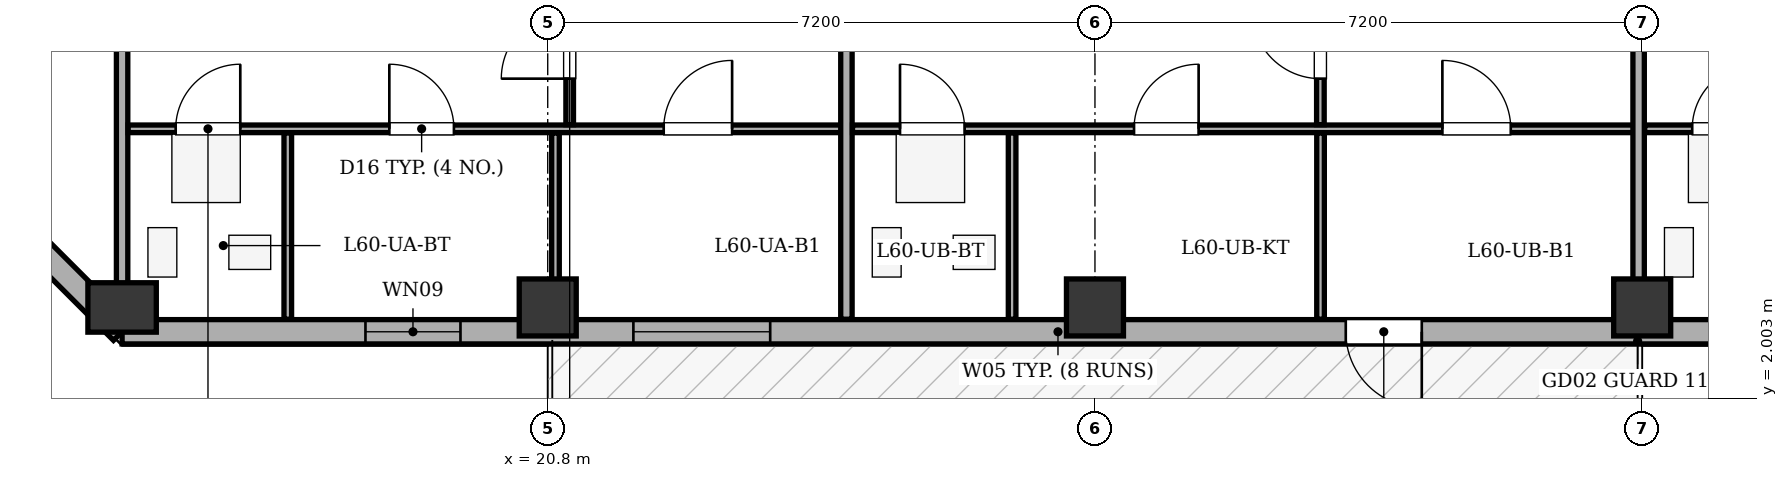
"""IFC4 building model, lengths in metres.
Left out: names, types, materials, properties, quantities, classifications, styles, units other than length and angle.
Written with IfcOpenShell. Run it as: python <this file> out.ifc"""

import sys

from ifc_helpers import new_model, si_unit, direction, frame, frame_2d, origin, origin_2d, place, context, subcontext, project, spatial, rectangle, extrude, element, fill, save


model = new_model("IFC4")
c1 = context("Model", 3, precision=1e-05, world=origin(), true_north=direction((0.0, 1.0)))
c2 = subcontext(c1, "Body", "Model", "MODEL_VIEW")
j1 = project(units=[si_unit("LENGTHUNIT", "METRE"), si_unit("PLANEANGLEUNIT", "RADIAN")], contexts=[c1])
p1 = place(None, origin())
s1 = spatial("IfcSite", under=j1, at=p1, CompositionType="ELEMENT")
p2 = place(p1, origin())
s2 = spatial("IfcBuilding", under=s1, at=p2, CompositionType="ELEMENT")
p3 = place(p2, frame((0.0, 0.0, 231.3)))
s3 = spatial("IfcBuildingStorey", under=s2, at=p3, CompositionType="ELEMENT", Elevation=231.3)
p4 = place(p3, frame((15.2, 3.2, 0.0), z_axis=(0.0, 0.0, 1.0), x_axis=(1.0, 0.0, 0.0)))
e1 = element("IfcColumn", 1, at=p4, inside=s3, PredefinedType="COLUMN", context=c2, shape_type="SweptSolid", body=[
    extrude(rectangle(XDim=0.65, YDim=0.9, at=origin_2d()), origin(), (0.0, 0.0, 1.0), 3.4),
])
for number, where, z_axis, x_axis in (
    (2, (20.8, 3.2, 0.0), (0.0, 0.0, 1.0), (1.0, 0.0, 0.0)),
    (3, (28.0, 3.2, 0.0), (0.0, 0.0, 1.0), (1.0, 0.0, 0.0)),
    (4, (35.2, 3.2, 0.0), (0.0, 0.0, 1.0), (1.0, 0.0, 0.0)),
):
    element("IfcColumn", number, at=place(p3, frame(where, z_axis=z_axis, x_axis=x_axis)), inside=s3, PredefinedType="COLUMN", context=c2, shape_type="SweptSolid", body=[
        extrude(rectangle(XDim=0.75, YDim=0.75, at=origin_2d()), origin(), (0.0, 0.0, 1.0), 3.4),
    ])
p5 = place(p3, frame((51.2, 2.88, 0.0), z_axis=(0.0, 0.0, 1.0), x_axis=(-1.0, 0.0, 0.0)))
e5 = element("IfcWall", 5, at=p5, inside=s3, PredefinedType="STANDARD", context=c2, shape_type="SweptSolid", body=[
    extrude(rectangle(XDim=36.0, YDim=0.32, at=frame_2d((18.0, 0.0))), origin(), (0.0, 0.0, 1.0), 2.725),
])
p6 = place(p5, frame((18.9, 0.0, 0.0)))
e6 = element("IfcOpeningElement", 6, at=p6, cuts=e5, PredefinedType="OPENING", context=c2, shape_type="SweptSolid", body=[
    extrude(rectangle(XDim=1.0, YDim=2.02, at=frame_2d((0.5, 1.01))), frame((0.0, 0.17, 0.0), z_axis=(0.0, -1.0, 0.0), x_axis=(1.0, 0.0, 0.0)), (0.0, 0.0, 1.0), 0.34),
])
p7 = place(p5, frame((2.31, 0.0, 0.75)))
e7 = element("IfcOpeningElement", 7, at=p7, cuts=e5, PredefinedType="OPENING", context=c2, shape_type="SweptSolid", body=[
    extrude(rectangle(XDim=1.8, YDim=1.7, at=frame_2d((0.9, 0.85))), frame((0.0, 0.17, 0.0), z_axis=(0.0, -1.0, 0.0), x_axis=(1.0, 0.0, 0.0)), (0.0, 0.0, 1.0), 0.34),
])
p8 = place(p5, frame((7.294, 0.0, 0.75)))
e8 = element("IfcOpeningElement", 8, at=p8, cuts=e5, PredefinedType="OPENING", context=c2, shape_type="SweptSolid", body=[
    extrude(rectangle(XDim=1.8, YDim=1.7, at=frame_2d((0.9, 0.85))), frame((0.0, 0.17, 0.0), z_axis=(0.0, -1.0, 0.0), x_axis=(1.0, 0.0, 0.0)), (0.0, 0.0, 1.0), 0.34),
])
p9 = place(p5, frame((11.117, 0.0, 0.75)))
e9 = element("IfcOpeningElement", 9, at=p9, cuts=e5, PredefinedType="OPENING", context=c2, shape_type="SweptSolid", body=[
    extrude(rectangle(XDim=1.8, YDim=1.7, at=frame_2d((0.9, 0.85))), frame((0.0, 0.17, 0.0), z_axis=(0.0, -1.0, 0.0), x_axis=(1.0, 0.0, 0.0)), (0.0, 0.0, 1.0), 0.34),
])
p10 = place(p5, frame((27.473, 0.0, 0.75)))
e10 = element("IfcOpeningElement", 10, at=p10, cuts=e5, PredefinedType="OPENING", context=c2, shape_type="SweptSolid", body=[
    extrude(rectangle(XDim=1.8, YDim=1.7, at=frame_2d((0.9, 0.85))), frame((0.0, 0.17, 0.0), z_axis=(0.0, -1.0, 0.0), x_axis=(1.0, 0.0, 0.0)), (0.0, 0.0, 1.0), 0.34),
])
p11 = place(p5, frame((31.548, 0.0, 0.75)))
e11 = element("IfcOpeningElement", 11, at=p11, cuts=e5, PredefinedType="OPENING", context=c2, shape_type="SweptSolid", body=[
    extrude(rectangle(XDim=1.25, YDim=1.7, at=frame_2d((0.625, 0.85))), frame((0.0, 0.17, 0.0), z_axis=(0.0, -1.0, 0.0), x_axis=(1.0, 0.0, 0.0)), (0.0, 0.0, 1.0), 0.34),
])
p12 = place(p3, frame((15.2, 2.88, 0.0), z_axis=(0.0, 0.0, 1.0), x_axis=(-0.707106781187, 0.707106781187, 0.0)))
e12 = element("IfcWall", 12, at=p12, inside=s3, PredefinedType="STANDARD", context=c2, shape_type="SweptSolid", body=[
    extrude(rectangle(XDim=6.11, YDim=0.32, at=frame_2d((3.055, 0.0))), origin(), (0.0, 0.0, 1.0), 2.725),
])
p13 = place(p12, frame((2.355, 0.0, 0.75)))
e13 = element("IfcOpeningElement", 13, at=p13, cuts=e12, PredefinedType="OPENING", context=c2, shape_type="SweptSolid", body=[
    extrude(rectangle(XDim=1.4, YDim=1.65, at=frame_2d((0.7, 0.825))), frame((0.0, 0.17, 0.0), z_axis=(0.0, -1.0, 0.0), x_axis=(1.0, 0.0, 0.0)), (0.0, 0.0, 1.0), 0.34),
])
p14 = place(p3, frame((15.2, 3.045, 0.0), z_axis=(0.0, 0.0, 1.0), x_axis=(0.0, 1.0, 0.0)))
e14 = element("IfcWall", 14, at=p14, inside=s3, PredefinedType="PARTITIONING", context=c2, shape_type="SweptSolid", body=[
    extrude(rectangle(XDim=15.255, YDim=0.15, at=frame_2d((7.627, 0.0))), origin(), (0.0, 0.0, 1.0), 3.1),
])
p15 = place(p3, frame((15.28, 5.55, 0.0), z_axis=(0.0, 0.0, 1.0), x_axis=(1.0, 0.0, 0.0)))
e15 = element("IfcWall", 15, at=p15, inside=s3, PredefinedType="PARTITIONING", context=c2, shape_type="SweptSolid", body=[
    extrude(rectangle(XDim=9.49, YDim=0.1, at=frame_2d((4.745, 0.0))), origin(), (0.0, 0.0, 1.0), 3.1),
])
p16 = place(p15, frame((0.625, 0.0, 0.0)))
e16 = element("IfcOpeningElement", 16, at=p16, cuts=e15, PredefinedType="OPENING", context=c2, shape_type="SweptSolid", body=[
    extrude(rectangle(XDim=0.85, YDim=2.05, at=frame_2d((0.425, 1.025))), frame((0.0, 0.06, 0.0), z_axis=(0.0, -1.0, 0.0), x_axis=(1.0, 0.0, 0.0)), (0.0, 0.0, 1.0), 0.12),
])
p17 = place(p15, frame((3.436, 0.0, 0.0)))
e17 = element("IfcOpeningElement", 17, at=p17, cuts=e15, PredefinedType="OPENING", context=c2, shape_type="SweptSolid", body=[
    extrude(rectangle(XDim=0.85, YDim=2.05, at=frame_2d((0.425, 1.025))), frame((0.0, 0.06, 0.0), z_axis=(0.0, -1.0, 0.0), x_axis=(1.0, 0.0, 0.0)), (0.0, 0.0, 1.0), 0.12),
])
p18 = place(p15, frame((7.046, 0.0, 0.0)))
e18 = element("IfcOpeningElement", 18, at=p18, cuts=e15, PredefinedType="OPENING", context=c2, shape_type="SweptSolid", body=[
    extrude(rectangle(XDim=0.9, YDim=2.05, at=frame_2d((0.45, 1.025))), frame((0.0, 0.06, 0.0), z_axis=(0.0, -1.0, 0.0), x_axis=(1.0, 0.0, 0.0)), (0.0, 0.0, 1.0), 0.12),
])
p19 = place(p3, frame((21.089, 5.605, 0.0), z_axis=(0.0, 0.0, 1.0), x_axis=(0.0, 1.0, 0.0)))
e19 = element("IfcWall", 19, at=p19, inside=s3, PredefinedType="PARTITIONING", context=c2, shape_type="SweptSolid", body=[
    extrude(rectangle(XDim=12.695, YDim=0.1, at=frame_2d((6.348, 0.0))), origin(), (0.0, 0.0, 1.0), 2.535),
])
p20 = place(p19, frame((0.605, 0.0, 0.0)))
e20 = element("IfcOpeningElement", 20, at=p20, cuts=e19, PredefinedType="OPENING", context=c2, shape_type="SweptSolid", body=[
    extrude(rectangle(XDim=0.9, YDim=2.05, at=frame_2d((0.45, 1.025))), frame((0.0, 0.06, 0.0), z_axis=(0.0, -1.0, 0.0), x_axis=(1.0, 0.0, 0.0)), (0.0, 0.0, 1.0), 0.12),
])
p21 = place(p3, frame((17.38, 3.045, 0.0), z_axis=(0.0, 0.0, 1.0), x_axis=(0.0, 1.0, 0.0)))
e21 = element("IfcWall", 21, at=p21, inside=s3, PredefinedType="PARTITIONING", context=c2, shape_type="SweptSolid", body=[
    extrude(rectangle(XDim=2.45, YDim=0.1, at=frame_2d((1.225, 0.0))), origin(), (0.0, 0.0, 1.0), 3.1),
])
p22 = place(p3, frame((20.902, 3.045, 0.0), z_axis=(0.0, 0.0, 1.0), x_axis=(0.0, 1.0, 0.0)))
e22 = element("IfcWall", 22, at=p22, inside=s3, PredefinedType="PARTITIONING", context=c2, shape_type="SweptSolid", body=[
    extrude(rectangle(XDim=2.45, YDim=0.1, at=frame_2d((1.225, 0.0))), origin(), (0.0, 0.0, 1.0), 2.535),
])
p23 = place(p3, frame((24.73, 3.045, 0.0), z_axis=(0.0, 0.0, 1.0), x_axis=(0.0, 1.0, 0.0)))
e23 = element("IfcWall", 23, at=p23, inside=s3, PredefinedType="PARTITIONING", context=c2, shape_type="SweptSolid", body=[
    extrude(rectangle(XDim=15.255, YDim=0.15, at=frame_2d((7.627, 0.0))), origin(), (0.0, 0.0, 1.0), 3.1),
])
p24 = place(p3, frame((24.81, 5.55, 0.0), z_axis=(0.0, 0.0, 1.0), x_axis=(1.0, 0.0, 0.0)))
e24 = element("IfcWall", 24, at=p24, inside=s3, PredefinedType="PARTITIONING", context=c2, shape_type="SweptSolid", body=[
    extrude(rectangle(XDim=10.383, YDim=0.1, at=frame_2d((5.191, 0.0))), origin(), (0.0, 0.0, 1.0), 3.1),
])
p25 = place(p24, frame((0.625, 0.0, 0.0)))
e25 = element("IfcOpeningElement", 25, at=p25, cuts=e24, PredefinedType="OPENING", context=c2, shape_type="SweptSolid", body=[
    extrude(rectangle(XDim=0.85, YDim=2.05, at=frame_2d((0.425, 1.025))), frame((0.0, 0.06, 0.0), z_axis=(0.0, -1.0, 0.0), x_axis=(1.0, 0.0, 0.0)), (0.0, 0.0, 1.0), 0.12),
])
p26 = place(p24, frame((3.704, 0.0, 0.0)))
e26 = element("IfcOpeningElement", 26, at=p26, cuts=e24, PredefinedType="OPENING", context=c2, shape_type="SweptSolid", body=[
    extrude(rectangle(XDim=0.85, YDim=2.05, at=frame_2d((0.425, 1.025))), frame((0.0, 0.06, 0.0), z_axis=(0.0, -1.0, 0.0), x_axis=(1.0, 0.0, 0.0)), (0.0, 0.0, 1.0), 0.12),
])
p27 = place(p24, frame((7.761, 0.0, 0.0)))
e27 = element("IfcOpeningElement", 27, at=p27, cuts=e24, PredefinedType="OPENING", context=c2, shape_type="SweptSolid", body=[
    extrude(rectangle(XDim=0.9, YDim=2.05, at=frame_2d((0.45, 1.025))), frame((0.0, 0.06, 0.0), z_axis=(0.0, -1.0, 0.0), x_axis=(1.0, 0.0, 0.0)), (0.0, 0.0, 1.0), 0.12),
])
p28 = place(p3, frame((30.966, 5.605, 0.0), z_axis=(0.0, 0.0, 1.0), x_axis=(0.0, 1.0, 0.0)))
e28 = element("IfcWall", 28, at=p28, inside=s3, PredefinedType="PARTITIONING", context=c2, shape_type="SweptSolid", body=[
    extrude(rectangle(XDim=12.695, YDim=0.1, at=frame_2d((6.348, 0.0))), origin(), (0.0, 0.0, 1.0), 3.1),
])
p29 = place(p28, frame((0.605, 0.0, 0.0)))
e29 = element("IfcOpeningElement", 29, at=p29, cuts=e28, PredefinedType="OPENING", context=c2, shape_type="SweptSolid", body=[
    extrude(rectangle(XDim=0.9, YDim=2.05, at=frame_2d((0.45, 1.025))), frame((0.0, 0.06, 0.0), z_axis=(0.0, -1.0, 0.0), x_axis=(1.0, 0.0, 0.0)), (0.0, 0.0, 1.0), 0.12),
])
for number, where, z_axis, x_axis in (
    (30, (26.91, 3.045, 0.0), (0.0, 0.0, 1.0), (0.0, 1.0, 0.0)),
    (31, (30.968, 3.045, 0.0), (0.0, 0.0, 1.0), (0.0, 1.0, 0.0)),
):
    element("IfcWall", number, at=place(p3, frame(where, z_axis=z_axis, x_axis=x_axis)), inside=s3, PredefinedType="PARTITIONING", context=c2, shape_type="SweptSolid", body=[
        extrude(rectangle(XDim=2.45, YDim=0.1, at=frame_2d((1.225, 0.0))), origin(), (0.0, 0.0, 1.0), 3.1),
    ])
p30 = place(p3, frame((35.153, 3.045, 0.0), z_axis=(0.0, 0.0, 1.0), x_axis=(0.0, 1.0, 0.0)))
e32 = element("IfcWall", 32, at=p30, inside=s3, PredefinedType="PARTITIONING", context=c2, shape_type="SweptSolid", body=[
    extrude(rectangle(XDim=15.255, YDim=0.15, at=frame_2d((7.627, 0.0))), origin(), (0.0, 0.0, 1.0), 2.535),
])
p31 = place(p3, frame((35.233, 5.55, 0.0), z_axis=(0.0, 0.0, 1.0), x_axis=(1.0, 0.0, 0.0)))
e33 = element("IfcWall", 33, at=p31, inside=s3, PredefinedType="PARTITIONING", context=c2, shape_type="SweptSolid", body=[
    extrude(rectangle(XDim=9.787, YDim=0.1, at=frame_2d((4.894, 0.0))), origin(), (0.0, 0.0, 1.0), 3.1),
])
p32 = place(p31, frame((0.625, 0.0, 0.0)))
e34 = element("IfcOpeningElement", 34, at=p32, cuts=e33, PredefinedType="OPENING", context=c2, shape_type="SweptSolid", body=[
    extrude(rectangle(XDim=0.85, YDim=2.05, at=frame_2d((0.425, 1.025))), frame((0.0, 0.06, 0.0), z_axis=(0.0, -1.0, 0.0), x_axis=(1.0, 0.0, 0.0)), (0.0, 0.0, 1.0), 0.12),
])
p33 = place(p31, frame((3.525, 0.0, 0.0)))
e35 = element("IfcOpeningElement", 35, at=p33, cuts=e33, PredefinedType="OPENING", context=c2, shape_type="SweptSolid", body=[
    extrude(rectangle(XDim=0.85, YDim=2.05, at=frame_2d((0.425, 1.025))), frame((0.0, 0.06, 0.0), z_axis=(0.0, -1.0, 0.0), x_axis=(1.0, 0.0, 0.0)), (0.0, 0.0, 1.0), 0.12),
])
p34 = place(p31, frame((7.284, 0.0, 0.0)))
e36 = element("IfcOpeningElement", 36, at=p34, cuts=e33, PredefinedType="OPENING", context=c2, shape_type="SweptSolid", body=[
    extrude(rectangle(XDim=0.9, YDim=2.05, at=frame_2d((0.45, 1.025))), frame((0.0, 0.06, 0.0), z_axis=(0.0, -1.0, 0.0), x_axis=(1.0, 0.0, 0.0)), (0.0, 0.0, 1.0), 0.12),
])
p35 = place(p6, origin())
e37 = element("IfcDoor", 37, at=p35, inside=s3, OperationType="SINGLE_SWING_LEFT", PredefinedType="DOOR", context=c2, shape_type="SweptSolid", body=[
    extrude(rectangle(XDim=1.0, YDim=2.02, at=frame_2d((0.5, 1.01))), frame((0.0, 0.025, 0.0), z_axis=(0.0, -1.0, 0.0), x_axis=(1.0, 0.0, 0.0)), (0.0, 0.0, 1.0), 0.05),
])
fill(e6, e37)
p36 = place(p10, origin())
e38 = element("IfcWindow", 38, at=p36, inside=s3, PartitioningType="SINGLE_PANEL", PredefinedType="WINDOW", context=c2, shape_type="SweptSolid", body=[
    extrude(rectangle(XDim=1.8, YDim=1.7, at=frame_2d((0.9, 0.85))), frame((0.0, -0.01, 0.0), z_axis=(0.0, -1.0, 0.0), x_axis=(1.0, 0.0, 0.0)), (0.0, 0.0, 1.0), 0.06),
])
fill(e10, e38)
p37 = place(p11, origin())
e39 = element("IfcWindow", 39, at=p37, inside=s3, PartitioningType="SINGLE_PANEL", PredefinedType="WINDOW", context=c2, shape_type="SweptSolid", body=[
    extrude(rectangle(XDim=1.25, YDim=1.7, at=frame_2d((0.625, 0.85))), frame((0.0, -0.01, 0.0), z_axis=(0.0, -1.0, 0.0), x_axis=(1.0, 0.0, 0.0)), (0.0, 0.0, 1.0), 0.06),
])
fill(e11, e39)
p38 = place(p20, origin())
e40 = element("IfcDoor", 40, at=p38, inside=s3, OperationType="SINGLE_SWING_LEFT", PredefinedType="DOOR", context=c2, shape_type="SweptSolid", body=[
    extrude(rectangle(XDim=0.9, YDim=2.05, at=frame_2d((0.45, 1.025))), frame((0.0, 0.025, 0.0), z_axis=(0.0, -1.0, 0.0), x_axis=(1.0, 0.0, 0.0)), (0.0, 0.0, 1.0), 0.05),
])
fill(e20, e40)
p39 = place(p16, origin())
e41 = element("IfcDoor", 41, at=p39, inside=s3, OperationType="SINGLE_SWING_RIGHT", PredefinedType="DOOR", context=c2, shape_type="SweptSolid", body=[
    extrude(rectangle(XDim=0.85, YDim=2.05, at=frame_2d((0.425, 1.025))), frame((0.0, 0.025, 0.0), z_axis=(0.0, -1.0, 0.0), x_axis=(1.0, 0.0, 0.0)), (0.0, 0.0, 1.0), 0.05),
])
fill(e16, e41)
p40 = place(p17, origin())
e42 = element("IfcDoor", 42, at=p40, inside=s3, OperationType="SINGLE_SWING_LEFT", PredefinedType="DOOR", context=c2, shape_type="SweptSolid", body=[
    extrude(rectangle(XDim=0.85, YDim=2.05, at=frame_2d((0.425, 1.025))), frame((0.0, 0.025, 0.0), z_axis=(0.0, -1.0, 0.0), x_axis=(1.0, 0.0, 0.0)), (0.0, 0.0, 1.0), 0.05),
])
fill(e17, e42)
p41 = place(p18, origin())
e43 = element("IfcDoor", 43, at=p41, inside=s3, OperationType="SINGLE_SWING_RIGHT", PredefinedType="DOOR", context=c2, shape_type="SweptSolid", body=[
    extrude(rectangle(XDim=0.9, YDim=2.05, at=frame_2d((0.45, 1.025))), frame((0.0, 0.025, 0.0), z_axis=(0.0, -1.0, 0.0), x_axis=(1.0, 0.0, 0.0)), (0.0, 0.0, 1.0), 0.05),
])
fill(e18, e43)
p42 = place(p29, origin())
e44 = element("IfcDoor", 44, at=p42, inside=s3, OperationType="SINGLE_SWING_RIGHT", PredefinedType="DOOR", context=c2, shape_type="SweptSolid", body=[
    extrude(rectangle(XDim=0.9, YDim=2.05, at=frame_2d((0.45, 1.025))), frame((0.0, 0.025, 0.0), z_axis=(0.0, -1.0, 0.0), x_axis=(1.0, 0.0, 0.0)), (0.0, 0.0, 1.0), 0.05),
])
fill(e29, e44)
p43 = place(p25, origin())
e45 = element("IfcDoor", 45, at=p43, inside=s3, OperationType="SINGLE_SWING_LEFT", PredefinedType="DOOR", context=c2, shape_type="SweptSolid", body=[
    extrude(rectangle(XDim=0.85, YDim=2.05, at=frame_2d((0.425, 1.025))), frame((0.0, 0.025, 0.0), z_axis=(0.0, -1.0, 0.0), x_axis=(1.0, 0.0, 0.0)), (0.0, 0.0, 1.0), 0.05),
])
fill(e25, e45)
p44 = place(p26, origin())
e46 = element("IfcDoor", 46, at=p44, inside=s3, OperationType="SINGLE_SWING_RIGHT", PredefinedType="DOOR", context=c2, shape_type="SweptSolid", body=[
    extrude(rectangle(XDim=0.85, YDim=2.05, at=frame_2d((0.425, 1.025))), frame((0.0, 0.025, 0.0), z_axis=(0.0, -1.0, 0.0), x_axis=(1.0, 0.0, 0.0)), (0.0, 0.0, 1.0), 0.05),
])
fill(e26, e46)
p45 = place(p27, origin())
e47 = element("IfcDoor", 47, at=p45, inside=s3, OperationType="SINGLE_SWING_LEFT", PredefinedType="DOOR", context=c2, shape_type="SweptSolid", body=[
    extrude(rectangle(XDim=0.9, YDim=2.05, at=frame_2d((0.45, 1.025))), frame((0.0, 0.025, 0.0), z_axis=(0.0, -1.0, 0.0), x_axis=(1.0, 0.0, 0.0)), (0.0, 0.0, 1.0), 0.05),
])
fill(e27, e47)
p46 = place(p32, origin())
e48 = element("IfcDoor", 48, at=p46, inside=s3, OperationType="SINGLE_SWING_RIGHT", PredefinedType="DOOR", context=c2, shape_type="SweptSolid", body=[
    extrude(rectangle(XDim=0.85, YDim=2.05, at=frame_2d((0.425, 1.025))), frame((0.0, 0.025, 0.0), z_axis=(0.0, -1.0, 0.0), x_axis=(1.0, 0.0, 0.0)), (0.0, 0.0, 1.0), 0.05),
])
fill(e34, e48)
save(model, sys.argv[1])
